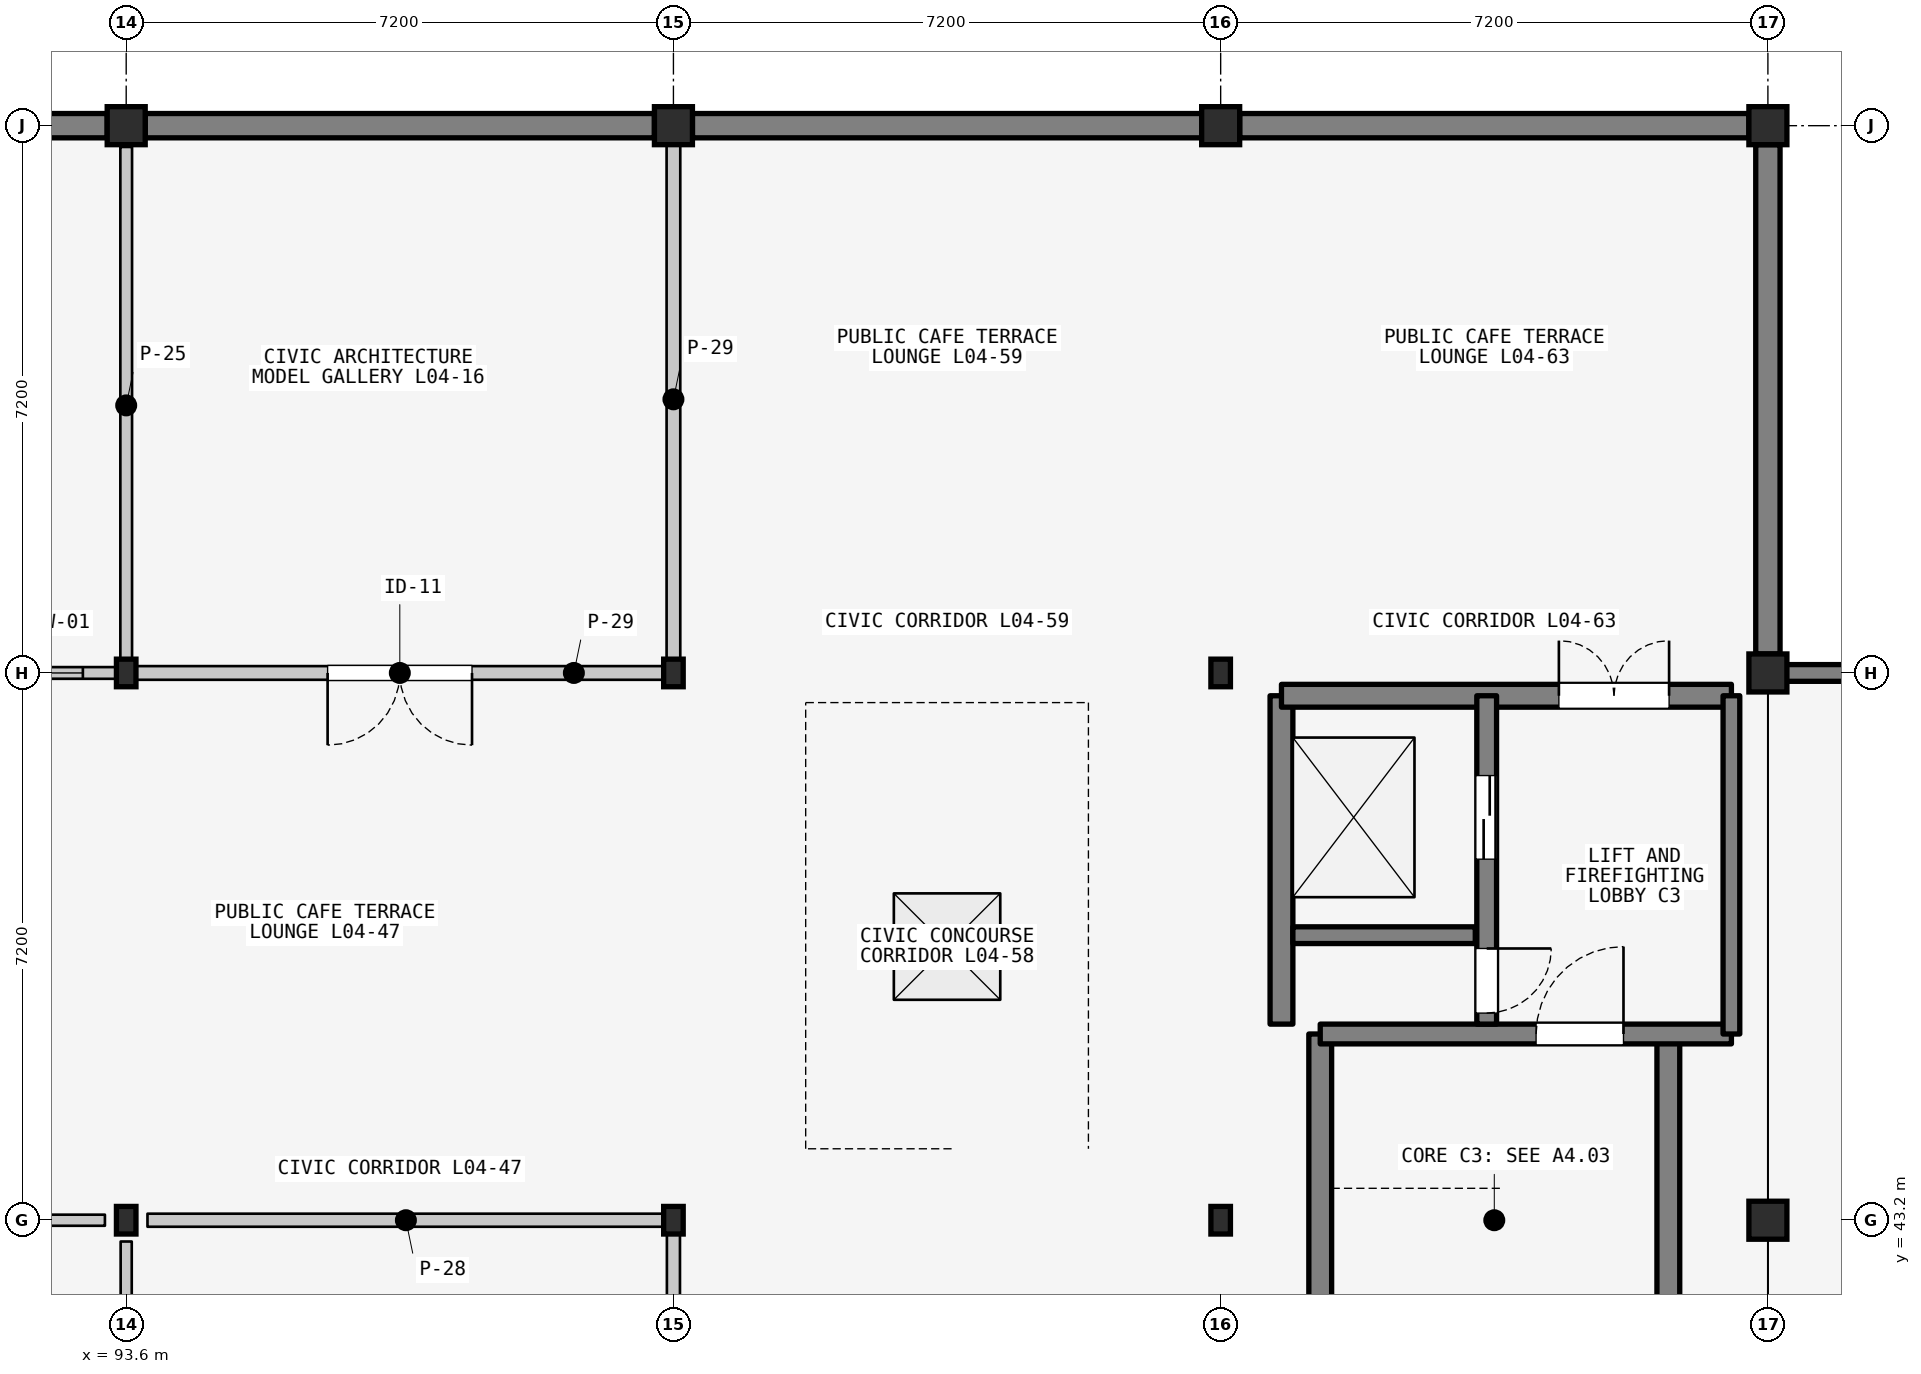
"""IFC4 building model, lengths in metres.
Left out: names, types, materials, properties, quantities, classifications, styles, units other than length and angle.
Written with IfcOpenShell. Run it as: python <this file> out.ifc"""

import sys

from ifc_helpers import new_model, si_unit, direction, frame, frame_2d, origin, origin_2d, place, context, subcontext, project, spatial, rectangle, i_section, extrude, element, fill, save


model = new_model("IFC4")
c1 = context("Model", 3, precision=1e-05, world=origin(), true_north=direction((0.0, 1.0)))
c2 = subcontext(c1, "Body", "Model", "MODEL_VIEW")
j1 = project(units=[si_unit("LENGTHUNIT", "METRE"), si_unit("PLANEANGLEUNIT", "RADIAN")], contexts=[c1])
p1 = place(None, origin())
s1 = spatial("IfcSite", under=j1, at=p1, CompositionType="ELEMENT")
p2 = place(p1, origin())
s2 = spatial("IfcBuilding", under=s1, at=p2, CompositionType="ELEMENT")
p3 = place(p2, frame((0.0, 0.0, 14.1)))
s3 = spatial("IfcBuildingStorey", under=s2, at=p3, CompositionType="ELEMENT", Elevation=14.1)
p4 = place(p3, frame((93.6, 43.2, 0.0), z_axis=(0.0, 0.0, 1.0), x_axis=(1.0, 0.0, 0.0)))
e1 = element("IfcColumn", 1, at=p4, inside=s3, PredefinedType="COLUMN", context=c2, shape_type="SweptSolid", body=[
    extrude(i_section(OverallWidth=0.257, OverallDepth=0.363, WebThickness=0.013, FlangeThickness=0.022, FilletRadius=0.015, at=origin_2d()), origin(), (0.0, 0.0, 1.0), 11.705),
])
p5 = place(p3, frame((93.6, 50.4, 0.0), z_axis=(0.0, 0.0, 1.0), x_axis=(1.0, 0.0, 0.0)))
e2 = element("IfcColumn", 2, at=p5, inside=s3, PredefinedType="COLUMN", context=c2, shape_type="SweptSolid", body=[
    extrude(i_section(OverallWidth=0.257, OverallDepth=0.363, WebThickness=0.013, FlangeThickness=0.022, FilletRadius=0.015, at=origin_2d()), origin(), (0.0, 0.0, 1.0), 13.048),
])
p6 = place(p3, frame((93.6, 57.6, 0.0), z_axis=(0.0, 0.0, 1.0), x_axis=(1.0, 0.0, 0.0)))
e3 = element("IfcColumn", 3, at=p6, inside=s3, PredefinedType="COLUMN", context=c2, shape_type="SweptSolid", body=[
    extrude(rectangle(XDim=0.5, YDim=0.5, at=origin_2d()), origin(), (0.0, 0.0, 1.0), 14.39),
])
p7 = place(p3, frame((100.8, 43.2, 0.0), z_axis=(0.0, 0.0, 1.0), x_axis=(1.0, 0.0, 0.0)))
e4 = element("IfcColumn", 4, at=p7, inside=s3, PredefinedType="COLUMN", context=c2, shape_type="SweptSolid", body=[
    extrude(i_section(OverallWidth=0.257, OverallDepth=0.363, WebThickness=0.013, FlangeThickness=0.022, FilletRadius=0.015, at=origin_2d()), origin(), (0.0, 0.0, 1.0), 11.733),
])
p8 = place(p3, frame((100.8, 50.4, 0.0), z_axis=(0.0, 0.0, 1.0), x_axis=(1.0, 0.0, 0.0)))
e5 = element("IfcColumn", 5, at=p8, inside=s3, PredefinedType="COLUMN", context=c2, shape_type="SweptSolid", body=[
    extrude(i_section(OverallWidth=0.257, OverallDepth=0.363, WebThickness=0.013, FlangeThickness=0.022, FilletRadius=0.015, at=origin_2d()), origin(), (0.0, 0.0, 1.0), 13.076),
])
p9 = place(p3, frame((100.8, 57.6, 0.0), z_axis=(0.0, 0.0, 1.0), x_axis=(1.0, 0.0, 0.0)))
e6 = element("IfcColumn", 6, at=p9, inside=s3, PredefinedType="COLUMN", context=c2, shape_type="SweptSolid", body=[
    extrude(rectangle(XDim=0.5, YDim=0.5, at=origin_2d()), origin(), (0.0, 0.0, 1.0), 14.419),
])
p10 = place(p3, frame((108.0, 43.2, 0.0), z_axis=(0.0, 0.0, 1.0), x_axis=(1.0, 0.0, 0.0)))
e7 = element("IfcColumn", 7, at=p10, inside=s3, PredefinedType="COLUMN", context=c2, shape_type="SweptSolid", body=[
    extrude(i_section(OverallWidth=0.257, OverallDepth=0.363, WebThickness=0.013, FlangeThickness=0.022, FilletRadius=0.015, at=origin_2d()), origin(), (0.0, 0.0, 1.0), 11.762),
])
p11 = place(p3, frame((108.0, 50.4, 0.0), z_axis=(0.0, 0.0, 1.0), x_axis=(1.0, 0.0, 0.0)))
e8 = element("IfcColumn", 8, at=p11, inside=s3, PredefinedType="COLUMN", context=c2, shape_type="SweptSolid", body=[
    extrude(i_section(OverallWidth=0.257, OverallDepth=0.363, WebThickness=0.013, FlangeThickness=0.022, FilletRadius=0.015, at=origin_2d()), origin(), (0.0, 0.0, 1.0), 13.105),
])
p12 = place(p3, frame((108.0, 57.6, 0.0), z_axis=(0.0, 0.0, 1.0), x_axis=(1.0, 0.0, 0.0)))
e9 = element("IfcColumn", 9, at=p12, inside=s3, PredefinedType="COLUMN", context=c2, shape_type="SweptSolid", body=[
    extrude(rectangle(XDim=0.5, YDim=0.5, at=origin_2d()), origin(), (0.0, 0.0, 1.0), 14.448),
])
p13 = place(p3, frame((115.2, 43.2, 0.0), z_axis=(0.0, 0.0, 1.0), x_axis=(1.0, 0.0, 0.0)))
e10 = element("IfcColumn", 10, at=p13, inside=s3, PredefinedType="COLUMN", context=c2, shape_type="SweptSolid", body=[
    extrude(rectangle(XDim=0.5, YDim=0.5, at=origin_2d()), origin(), (0.0, 0.0, 1.0), 11.79),
])
p14 = place(p3, frame((115.2, 50.4, 0.0), z_axis=(0.0, 0.0, 1.0), x_axis=(1.0, 0.0, 0.0)))
e11 = element("IfcColumn", 11, at=p14, inside=s3, PredefinedType="COLUMN", context=c2, shape_type="SweptSolid", body=[
    extrude(rectangle(XDim=0.5, YDim=0.5, at=origin_2d()), origin(), (0.0, 0.0, 1.0), 13.133),
])
p15 = place(p3, frame((115.2, 57.6, 0.0), z_axis=(0.0, 0.0, 1.0), x_axis=(1.0, 0.0, 0.0)))
e12 = element("IfcColumn", 12, at=p15, inside=s3, PredefinedType="COLUMN", context=c2, shape_type="SweptSolid", body=[
    extrude(rectangle(XDim=0.5, YDim=0.5, at=origin_2d()), origin(), (0.0, 0.0, 1.0), 14.476),
])
p16 = place(p3, frame((86.65, 57.6, 0.0), z_axis=(0.0, 0.0, 1.0), x_axis=(1.0, 0.0, 0.0)))
e13 = element("IfcWall", 13, at=p16, inside=s3, PredefinedType="SOLIDWALL", context=c2, shape_type="SweptSolid", body=[
    extrude(rectangle(XDim=6.7, YDim=0.32, at=frame_2d((3.35, 0.0))), origin(), (0.0, 0.0, 1.0), 13.635),
])
p17 = place(p3, frame((93.85, 57.6, 0.0), z_axis=(0.0, 0.0, 1.0), x_axis=(1.0, 0.0, 0.0)))
e14 = element("IfcWall", 14, at=p17, inside=s3, PredefinedType="SOLIDWALL", context=c2, shape_type="SweptSolid", body=[
    extrude(rectangle(XDim=6.7, YDim=0.32, at=frame_2d((3.35, 0.0))), origin(), (0.0, 0.0, 1.0), 13.663),
])
p18 = place(p3, frame((101.05, 57.6, 0.0), z_axis=(0.0, 0.0, 1.0), x_axis=(1.0, 0.0, 0.0)))
e15 = element("IfcWall", 15, at=p18, inside=s3, PredefinedType="SOLIDWALL", context=c2, shape_type="SweptSolid", body=[
    extrude(rectangle(XDim=6.7, YDim=0.32, at=frame_2d((3.35, 0.0))), origin(), (0.0, 0.0, 1.0), 13.692),
])
p19 = place(p3, frame((108.25, 57.6, 0.0), z_axis=(0.0, 0.0, 1.0), x_axis=(1.0, 0.0, 0.0)))
e16 = element("IfcWall", 16, at=p19, inside=s3, PredefinedType="SOLIDWALL", context=c2, shape_type="SweptSolid", body=[
    extrude(rectangle(XDim=6.7, YDim=0.32, at=frame_2d((3.35, 0.0))), origin(), (0.0, 0.0, 1.0), 13.72),
])
p20 = place(p3, frame((115.2, 57.35, 0.0), z_axis=(0.0, 0.0, 1.0), x_axis=(0.0, -1.0, 0.0)))
e17 = element("IfcWall", 17, at=p20, inside=s3, PredefinedType="SOLIDWALL", context=c2, shape_type="SweptSolid", body=[
    extrude(rectangle(XDim=6.7, YDim=0.32, at=frame_2d((3.35, 0.0))), origin(), (0.0, 0.0, 1.0), 12.45),
])
p21 = place(p3, frame((115.35, 50.4, 0.0), z_axis=(0.0, 0.0, 1.0), x_axis=(1.0, 0.0, 0.0)))
e18 = element("IfcWall", 18, at=p21, inside=s3, PredefinedType="PARAPET", context=c2, shape_type="SweptSolid", body=[
    extrude(rectangle(XDim=6.9, YDim=0.22, at=frame_2d((3.45, 0.0))), origin(), (0.0, 0.0, 1.0), 0.85),
])
for number, where, z_axis, x_axis in (
    (19, (109.31, 36.35, 0.0), (0.0, 0.0, 1.0), (0.0, 1.0, 0.0)),
    (20, (113.89, 36.35, 0.0), (0.0, 0.0, 1.0), (0.0, 1.0, 0.0)),
):
    element("IfcWall", number, at=place(p3, frame(where, z_axis=z_axis, x_axis=x_axis)), inside=s3, PredefinedType="SHEAR", context=c2, shape_type="SweptSolid", body=[
        extrude(rectangle(XDim=9.3, YDim=0.3, at=frame_2d((4.65, 0.0))), origin(), (0.0, 0.0, 1.0), 3.72),
    ])
p22 = place(p3, frame((109.31, 45.65, 0.0), z_axis=(0.0, 0.0, 1.0), x_axis=(1.0, 0.0, 0.0)))
e21 = element("IfcWall", 21, at=p22, inside=s3, PredefinedType="SHEAR", context=c2, shape_type="SweptSolid", body=[
    extrude(rectangle(XDim=5.41, YDim=0.26, at=frame_2d((2.705, 0.0))), origin(), (0.0, 0.0, 1.0), 3.72),
])
p23 = place(p22, frame((2.84, 0.0, 0.0)))
e22 = element("IfcOpeningElement", 22, at=p23, cuts=e21, PredefinedType="OPENING", context=c2, shape_type="SweptSolid", body=[
    extrude(rectangle(XDim=1.15, YDim=2.15, at=frame_2d((0.575, 1.075))), frame((0.0, 0.14, 0.0), z_axis=(0.0, -1.0, 0.0), x_axis=(1.0, 0.0, 0.0)), (0.0, 0.0, 1.0), 0.28),
])
p24 = place(p3, frame((108.8, 45.78, 0.0), z_axis=(0.0, 0.0, 1.0), x_axis=(0.0, 1.0, 0.0)))
e23 = element("IfcWall", 23, at=p24, inside=s3, PredefinedType="SHEAR", context=c2, shape_type="SweptSolid", body=[
    extrude(rectangle(XDim=4.32, YDim=0.3, at=frame_2d((2.16, 0.0))), origin(), (0.0, 0.0, 1.0), 3.72),
])
p25 = place(p3, frame((108.8, 50.1, 0.0), z_axis=(0.0, 0.0, 1.0), x_axis=(1.0, 0.0, 0.0)))
e24 = element("IfcWall", 24, at=p25, inside=s3, PredefinedType="SHEAR", context=c2, shape_type="SweptSolid", body=[
    extrude(rectangle(XDim=5.92, YDim=0.3, at=frame_2d((2.96, 0.0))), origin(), (0.0, 0.0, 1.0), 3.72),
])
p26 = place(p25, frame((3.65, 0.0, 0.0)))
e25 = element("IfcOpeningElement", 25, at=p26, cuts=e24, PredefinedType="OPENING", context=c2, shape_type="SweptSolid", body=[
    extrude(rectangle(XDim=1.45, YDim=2.2, at=frame_2d((0.725, 1.1))), frame((0.0, 0.16, 0.0), z_axis=(0.0, -1.0, 0.0), x_axis=(1.0, 0.0, 0.0)), (0.0, 0.0, 1.0), 0.32),
])
p27 = place(p3, frame((108.95, 46.95, 0.0), z_axis=(0.0, 0.0, 1.0), x_axis=(1.0, 0.0, 0.0)))
e26 = element("IfcWall", 26, at=p27, inside=s3, PredefinedType="SHEAR", context=c2, shape_type="SweptSolid", body=[
    extrude(rectangle(XDim=2.4, YDim=0.22, at=frame_2d((1.2, 0.0))), origin(), (0.0, 0.0, 1.0), 3.72),
])
p28 = place(p3, frame((111.5, 50.1, 0.0), z_axis=(0.0, 0.0, 1.0), x_axis=(0.0, -1.0, 0.0)))
e27 = element("IfcWall", 27, at=p28, inside=s3, PredefinedType="SHEAR", context=c2, shape_type="SweptSolid", body=[
    extrude(rectangle(XDim=4.32, YDim=0.26, at=frame_2d((2.16, 0.0))), origin(), (0.0, 0.0, 1.0), 3.72),
])
p29 = place(p28, frame((1.05, 0.0, 0.0)))
e28 = element("IfcOpeningElement", 28, at=p29, cuts=e27, PredefinedType="OPENING", context=c2, shape_type="SweptSolid", body=[
    extrude(rectangle(XDim=1.1, YDim=2.15, at=frame_2d((0.55, 1.075))), frame((0.0, 0.14, 0.0), z_axis=(0.0, -1.0, 0.0), x_axis=(1.0, 0.0, 0.0)), (0.0, 0.0, 1.0), 0.28),
])
p30 = place(p28, frame((3.325, 0.0, 0.0)))
e29 = element("IfcOpeningElement", 29, at=p30, cuts=e27, PredefinedType="OPENING", context=c2, shape_type="SweptSolid", body=[
    extrude(rectangle(XDim=0.85, YDim=2.05, at=frame_2d((0.425, 1.025))), frame((0.0, 0.14, 0.0), z_axis=(0.0, -1.0, 0.0), x_axis=(1.0, 0.0, 0.0)), (0.0, 0.0, 1.0), 0.28),
])
p31 = place(p3, frame((114.72, 50.1, 0.0), z_axis=(0.0, 0.0, 1.0), x_axis=(0.0, -1.0, 0.0)))
e30 = element("IfcWall", 30, at=p31, inside=s3, PredefinedType="SHEAR", context=c2, shape_type="SweptSolid", body=[
    extrude(rectangle(XDim=4.45, YDim=0.22, at=frame_2d((2.225, 0.0))), origin(), (0.0, 0.0, 1.0), 3.72),
])
p32 = place(p3, frame((93.6, 42.92, 0.0), z_axis=(0.0, 0.0, 1.0), x_axis=(0.0, -1.0, 0.0)))
e31 = element("IfcWall", 31, at=p32, inside=s3, PredefinedType="PARTITIONING", context=c2, shape_type="SweptSolid", body=[
    extrude(rectangle(XDim=6.8, YDim=0.146, at=frame_2d((3.4, 0.0))), origin(), (0.0, 0.0, 1.0), 3.72),
])
p33 = place(p3, frame((86.68, 43.2, 0.0), z_axis=(0.0, 0.0, 1.0), x_axis=(1.0, 0.0, 0.0)))
e32 = element("IfcWall", 32, at=p33, inside=s3, PredefinedType="PARTITIONING", context=c2, shape_type="SweptSolid", body=[
    extrude(rectangle(XDim=6.64, YDim=0.146, at=frame_2d((3.32, 0.0))), origin(), (0.0, 0.0, 1.0), 3.72),
])
p34 = place(p3, frame((93.48, 50.4, 0.0), z_axis=(0.0, 0.0, 1.0), x_axis=(-1.0, 0.0, 0.0)))
e33 = element("IfcWall", 33, at=p34, inside=s3, PredefinedType="PARTITIONING", context=c2, shape_type="SweptSolid", body=[
    extrude(rectangle(XDim=6.96, YDim=0.154, at=frame_2d((3.48, 0.0))), origin(), (0.0, 0.0, 1.0), 3.72),
])
p35 = place(p34, frame((2.53, 0.0, 0.0)))
e34 = element("IfcOpeningElement", 34, at=p35, cuts=e33, PredefinedType="OPENING", context=c2, shape_type="SweptSolid", body=[
    extrude(rectangle(XDim=1.9, YDim=2.45, at=frame_2d((0.95, 1.225))), frame((0.0, 0.087, 0.0), z_axis=(0.0, -1.0, 0.0), x_axis=(1.0, 0.0, 0.0)), (0.0, 0.0, 1.0), 0.174),
])
p36 = place(p34, frame((0.45, 0.0, 1.05)))
e35 = element("IfcOpeningElement", 35, at=p36, cuts=e33, PredefinedType="OPENING", context=c2, shape_type="SweptSolid", body=[
    extrude(rectangle(XDim=1.6, YDim=1.2, at=frame_2d((0.8, 0.6))), frame((0.0, 0.087, 0.0), z_axis=(0.0, -1.0, 0.0), x_axis=(1.0, 0.0, 0.0)), (0.0, 0.0, 1.0), 0.174),
])
p37 = place(p3, frame((93.6, 57.32, 0.0), z_axis=(0.0, 0.0, 1.0), x_axis=(0.0, -1.0, 0.0)))
e36 = element("IfcWall", 36, at=p37, inside=s3, PredefinedType="PARTITIONING", context=c2, shape_type="SweptSolid", body=[
    extrude(rectangle(XDim=6.8, YDim=0.154, at=frame_2d((3.4, 0.0))), origin(), (0.0, 0.0, 1.0), 3.72),
])
p38 = place(p3, frame((93.88, 43.2, 0.0), z_axis=(0.0, 0.0, 1.0), x_axis=(1.0, 0.0, 0.0)))
e37 = element("IfcWall", 37, at=p38, inside=s3, PredefinedType="PARTITIONING", context=c2, shape_type="SweptSolid", body=[
    extrude(rectangle(XDim=6.8, YDim=0.172, at=frame_2d((3.4, 0.0))), origin(), (0.0, 0.0, 1.0), 3.72),
])
p39 = place(p3, frame((100.8, 43.08, 0.0), z_axis=(0.0, 0.0, 1.0), x_axis=(0.0, -1.0, 0.0)))
e38 = element("IfcWall", 38, at=p39, inside=s3, PredefinedType="PARTITIONING", context=c2, shape_type="SweptSolid", body=[
    extrude(rectangle(XDim=6.96, YDim=0.172, at=frame_2d((3.48, 0.0))), origin(), (0.0, 0.0, 1.0), 3.72),
])
p40 = place(p3, frame((100.68, 50.4, 0.0), z_axis=(0.0, 0.0, 1.0), x_axis=(-1.0, 0.0, 0.0)))
e39 = element("IfcWall", 39, at=p40, inside=s3, PredefinedType="PARTITIONING", context=c2, shape_type="SweptSolid", body=[
    extrude(rectangle(XDim=6.96, YDim=0.18, at=frame_2d((3.48, 0.0))), origin(), (0.0, 0.0, 1.0), 3.72),
])
p41 = place(p40, frame((2.53, 0.0, 0.0)))
e40 = element("IfcOpeningElement", 40, at=p41, cuts=e39, PredefinedType="OPENING", context=c2, shape_type="SweptSolid", body=[
    extrude(rectangle(XDim=1.9, YDim=2.45, at=frame_2d((0.95, 1.225))), frame((0.0, 0.1, 0.0), z_axis=(0.0, -1.0, 0.0), x_axis=(1.0, 0.0, 0.0)), (0.0, 0.0, 1.0), 0.2),
])
p42 = place(p3, frame((100.8, 57.48, 0.0), z_axis=(0.0, 0.0, 1.0), x_axis=(0.0, -1.0, 0.0)))
e41 = element("IfcWall", 41, at=p42, inside=s3, PredefinedType="PARTITIONING", context=c2, shape_type="SweptSolid", body=[
    extrude(rectangle(XDim=6.96, YDim=0.18, at=frame_2d((3.48, 0.0))), origin(), (0.0, 0.0, 1.0), 3.72),
])
p43 = place(p3, frame((64.8, 7.2, 5.1), z_axis=(-0.003900009496, -0.183347177316, 0.983040488737), x_axis=(0.999992130387, 0.0, 0.003967261622)))
p44 = place(p43, frame((39.629, 40.283, 0.0)))
p45 = place(p44, origin())
e42 = element("IfcWindow", 42, at=p45, inside=s3, PartitioningType="SINGLE_PANEL", PredefinedType="LIGHTDOME", context=c2, shape_type="SweptSolid", body=[
    extrude(rectangle(XDim=1.4, YDim=1.4, at=origin_2d()), origin(), (0.0, 0.0, -1.0), 0.06),
])
p46 = place(p23, origin())
e43 = element("IfcDoor", 43, at=p46, inside=s3, OperationType="SINGLE_SWING_RIGHT", PredefinedType="DOOR", context=c2, shape_type="SweptSolid", body=[
    extrude(rectangle(XDim=1.15, YDim=2.15, at=frame_2d((0.575, 1.075))), frame((0.0, 0.025, 0.0), z_axis=(0.0, -1.0, 0.0), x_axis=(1.0, 0.0, 0.0)), (0.0, 0.0, 1.0), 0.05),
])
fill(e22, e43)
p47 = place(p29, origin())
e44 = element("IfcDoor", 44, at=p47, inside=s3, OperationType="DOUBLE_DOOR_SLIDING", PredefinedType="DOOR", context=c2, shape_type="SweptSolid", body=[
    extrude(rectangle(XDim=1.1, YDim=2.15, at=frame_2d((0.55, 1.075))), frame((0.0, 0.025, 0.0), z_axis=(0.0, -1.0, 0.0), x_axis=(1.0, 0.0, 0.0)), (0.0, 0.0, 1.0), 0.05),
])
fill(e28, e44)
p48 = place(p30, origin())
e45 = element("IfcDoor", 45, at=p48, inside=s3, OperationType="SINGLE_SWING_LEFT", PredefinedType="DOOR", context=c2, shape_type="SweptSolid", body=[
    extrude(rectangle(XDim=0.85, YDim=2.05, at=frame_2d((0.425, 1.025))), frame((0.0, 0.025, 0.0), z_axis=(0.0, -1.0, 0.0), x_axis=(1.0, 0.0, 0.0)), (0.0, 0.0, 1.0), 0.05),
])
fill(e29, e45)
p49 = place(p26, origin())
e46 = element("IfcDoor", 46, at=p49, inside=s3, OperationType="DOUBLE_DOOR_SINGLE_SWING", PredefinedType="DOOR", context=c2, shape_type="SweptSolid", body=[
    extrude(rectangle(XDim=1.45, YDim=2.2, at=frame_2d((0.725, 1.1))), frame((0.0, 0.025, 0.0), z_axis=(0.0, -1.0, 0.0), x_axis=(1.0, 0.0, 0.0)), (0.0, 0.0, 1.0), 0.05),
])
fill(e25, e46)
p50 = place(p36, origin())
e47 = element("IfcWindow", 47, at=p50, inside=s3, PartitioningType="SINGLE_PANEL", PredefinedType="WINDOW", context=c2, shape_type="SweptSolid", body=[
    extrude(rectangle(XDim=1.6, YDim=1.2, at=frame_2d((0.8, 0.6))), frame((0.0, 0.03, 0.0), z_axis=(0.0, -1.0, 0.0), x_axis=(1.0, 0.0, 0.0)), (0.0, 0.0, 1.0), 0.06),
])
fill(e35, e47)
p51 = place(p41, origin())
e48 = element("IfcDoor", 48, at=p51, inside=s3, OperationType="DOUBLE_DOOR_SINGLE_SWING", PredefinedType="DOOR", context=c2, shape_type="SweptSolid", body=[
    extrude(rectangle(XDim=1.9, YDim=2.45, at=frame_2d((0.95, 1.225))), frame((0.0, 0.025, 0.0), z_axis=(0.0, -1.0, 0.0), x_axis=(1.0, 0.0, 0.0)), (0.0, 0.0, 1.0), 0.05),
])
fill(e40, e48)
save(model, sys.argv[1])
